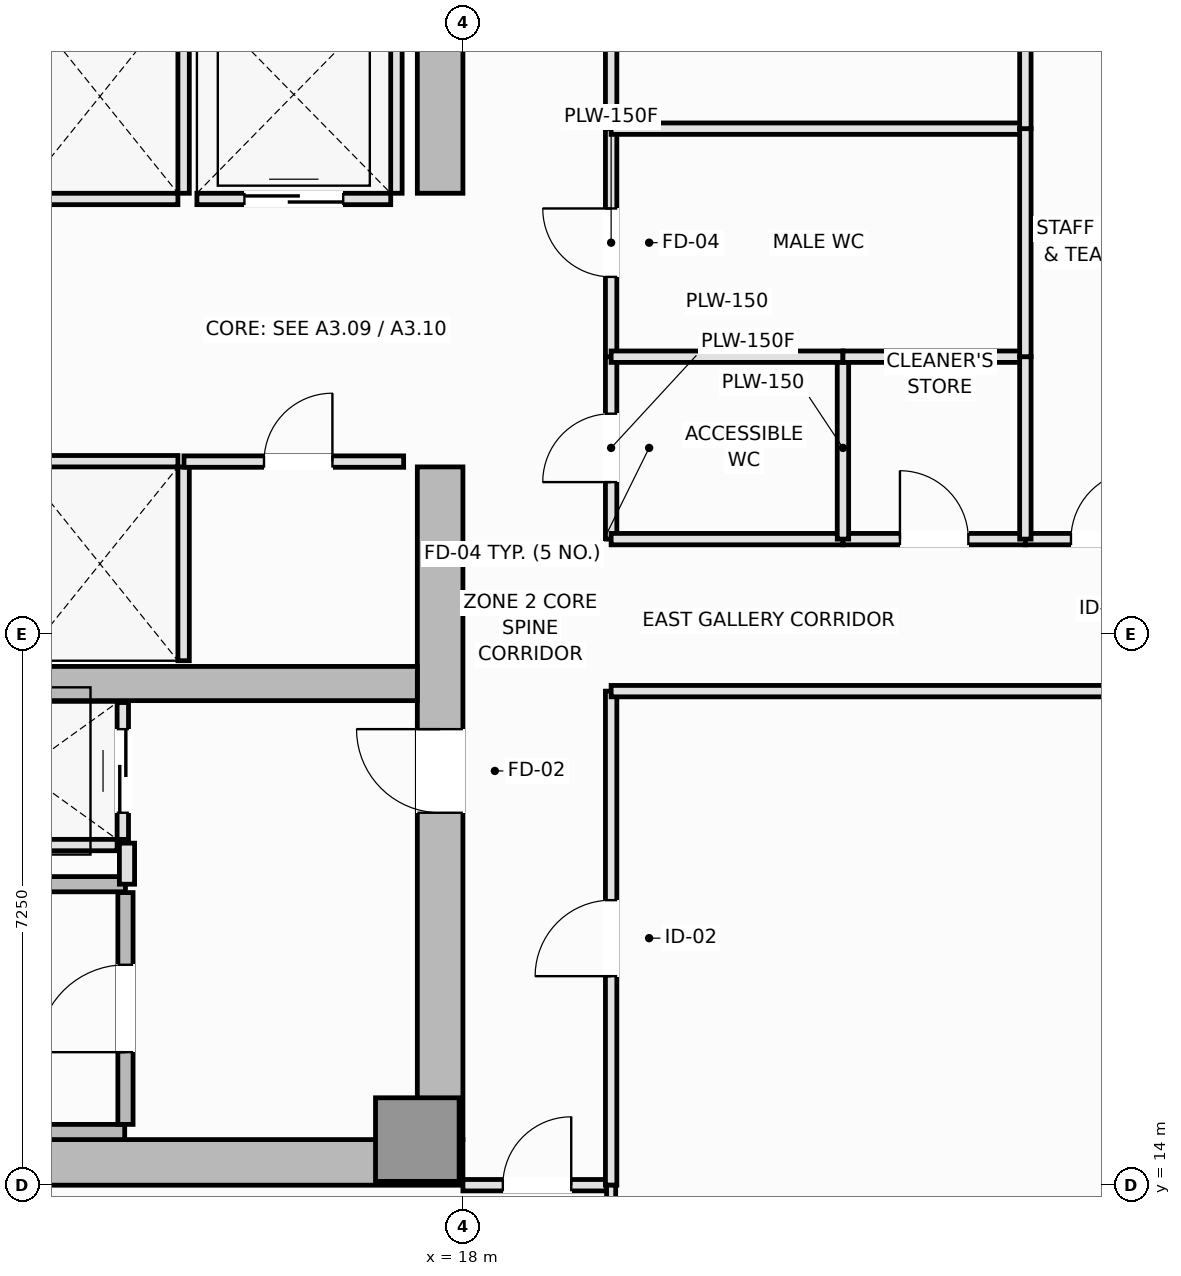
"""IFC4 building model, lengths in metres.
Left out: names, types, materials, properties, quantities, classifications, styles, units other than length and angle.
Written with IfcOpenShell. Run it as: python <this file> out.ifc"""

import sys

from ifc_helpers import new_model, si_unit, direction, frame, frame_2d, origin, origin_2d, place, context, subcontext, project, spatial, rectangle, extrude, element, fill, save


model = new_model("IFC4")
c1 = context("Model", 3, precision=1e-05, world=origin(), true_north=direction((0.0, 1.0)))
c2 = subcontext(c1, "Body", "Model", "MODEL_VIEW")
j1 = project(units=[si_unit("LENGTHUNIT", "METRE"), si_unit("PLANEANGLEUNIT", "RADIAN")], contexts=[c1])
p1 = place(None, origin())
s1 = spatial("IfcSite", under=j1, at=p1, CompositionType="ELEMENT")
p2 = place(p1, origin())
s2 = spatial("IfcBuilding", under=s1, at=p2, CompositionType="ELEMENT")
p3 = place(p2, frame((0.0, 0.0, 105.8)))
s3 = spatial("IfcBuildingStorey", under=s2, at=p3, CompositionType="ELEMENT", Elevation=105.8)
p4 = place(p3, frame((4.5, 14.3, 0.0), z_axis=(0.0, 0.0, 1.0), x_axis=(1.0, 0.0, 0.0)))
e1 = element("IfcWall", 1, at=p4, inside=s3, PredefinedType="SHEAR", context=c2, shape_type="SweptSolid", body=[
    extrude(rectangle(XDim=13.5, YDim=0.6, at=frame_2d((6.75, 0.0))), origin(), (0.0, 0.0, 1.0), 3.55),
])
p5 = place(p3, frame((17.7, 14.6, 0.0), z_axis=(0.0, 0.0, 1.0), x_axis=(0.0, 1.0, 0.0)))
e2 = element("IfcWall", 2, at=p5, inside=s3, PredefinedType="SHEAR", context=c2, shape_type="SweptSolid", body=[
    extrude(rectangle(XDim=8.85, YDim=0.6, at=frame_2d((4.425, 0.0))), origin(), (0.0, 0.0, 1.0), 3.55),
])
p6 = place(p5, frame((4.3, 0.0, 0.0)))
e3 = element("IfcOpeningElement", 3, at=p6, cuts=e2, PredefinedType="OPENING", context=c2, shape_type="SweptSolid", body=[
    extrude(rectangle(XDim=1.1, YDim=2.15, at=frame_2d((0.55, 1.075))), frame((0.0, 0.31, 0.0), z_axis=(0.0, -1.0, 0.0), x_axis=(1.0, 0.0, 0.0)), (0.0, 0.0, 1.0), 0.62),
])
p7 = place(p3, frame((17.7, 27.05, 0.0), z_axis=(0.0, 0.0, 1.0), x_axis=(0.0, 1.0, 0.0)))
e4 = element("IfcWall", 4, at=p7, inside=s3, PredefinedType="SHEAR", context=c2, shape_type="SweptSolid", body=[
    extrude(rectangle(XDim=8.85, YDim=0.6, at=frame_2d((4.425, 0.0))), origin(), (0.0, 0.0, 1.0), 3.55),
])
p8 = place(p7, frame((3.45, 0.0, 0.0)))
e5 = element("IfcOpeningElement", 5, at=p8, cuts=e4, PredefinedType="OPENING", context=c2, shape_type="SweptSolid", body=[
    extrude(rectangle(XDim=1.1, YDim=2.15, at=frame_2d((0.55, 1.075))), frame((0.0, 0.31, 0.0), z_axis=(0.0, -1.0, 0.0), x_axis=(1.0, 0.0, 0.0)), (0.0, 0.0, 1.0), 0.62),
])
p9 = place(p3, frame((5.1, 20.6, 0.0), z_axis=(0.0, 0.0, 1.0), x_axis=(1.0, 0.0, 0.0)))
e6 = element("IfcWall", 6, at=p9, inside=s3, PredefinedType="SHEAR", context=c2, shape_type="SweptSolid", body=[
    extrude(rectangle(XDim=12.3, YDim=0.45, at=frame_2d((6.15, 0.0))), origin(), (0.0, 0.0, 1.0), 3.55),
])
p10 = place(p3, frame((17.4, 14.6, 0.0), z_axis=(0.0, 0.0, 1.0), x_axis=(1.0, 0.0, 0.0)))
e7 = element("IfcColumn", 7, at=p10, inside=s3, PredefinedType="PILASTER", context=c2, shape_type="SweptSolid", body=[
    extrude(rectangle(XDim=1.1, YDim=1.1, at=origin_2d()), origin(), (0.0, 0.0, 1.0), 3.55),
])
p11 = place(p3, frame((5.8, 14.7, 0.0), z_axis=(0.0, 0.0, 1.0), x_axis=(1.0, 0.0, 0.0)))
e8 = element("IfcWall", 8, at=p11, inside=s3, PredefinedType="SOLIDWALL", context=c2, shape_type="SweptSolid", body=[
    extrude(rectangle(XDim=7.75, YDim=0.2, at=frame_2d((3.875, 0.0))), origin(), (0.0, 0.0, 1.0), 3.55),
])
p12 = place(p3, frame((5.9, 17.96, 0.0), z_axis=(0.0, 0.0, 1.0), x_axis=(1.0, 0.0, 0.0)))
e9 = element("IfcWall", 9, at=p12, inside=s3, PredefinedType="SOLIDWALL", context=c2, shape_type="SweptSolid", body=[
    extrude(rectangle(XDim=7.66, YDim=0.2, at=frame_2d((3.83, 0.0))), origin(), (0.0, 0.0, 1.0), 3.55),
])
p13 = place(p3, frame((13.56, 14.8, 0.0), z_axis=(0.0, 0.0, 1.0), x_axis=(0.0, 1.0, 0.0)))
e10 = element("IfcWall", 10, at=p13, inside=s3, PredefinedType="SOLIDWALL", context=c2, shape_type="SweptSolid", body=[
    extrude(rectangle(XDim=3.05, YDim=0.2, at=frame_2d((1.525, 0.0))), origin(), (0.0, 0.0, 1.0), 3.55),
])
p14 = place(p13, frame((0.95, 0.0, 0.0)))
e11 = element("IfcOpeningElement", 11, at=p14, cuts=e10, PredefinedType="OPENING", context=c2, shape_type="SweptSolid", body=[
    extrude(rectangle(XDim=1.15, YDim=2.15, at=frame_2d((0.575, 1.075))), frame((0.0, 0.11, 0.0), z_axis=(0.0, -1.0, 0.0), x_axis=(1.0, 0.0, 0.0)), (0.0, 0.0, 1.0), 0.22),
])
p15 = place(p3, frame((12.2, 23.525, 0.0), z_axis=(0.0, 0.0, 1.0), x_axis=(1.0, 0.0, 0.0)))
e12 = element("IfcWall", 12, at=p15, inside=s3, PredefinedType="PARTITIONING", context=c2, shape_type="SweptSolid", body=[
    extrude(rectangle(XDim=2.05, YDim=0.15, at=frame_2d((1.025, 0.0))), origin(), (0.0, 0.0, 1.0), 3.37),
])
p16 = place(p3, frame((14.325, 20.9, 0.0), z_axis=(0.0, 0.0, 1.0), x_axis=(0.0, 1.0, 0.0)))
e13 = element("IfcWall", 13, at=p16, inside=s3, PredefinedType="PARTITIONING", context=c2, shape_type="SweptSolid", body=[
    extrude(rectangle(XDim=2.55, YDim=0.15, at=frame_2d((1.275, 0.0))), origin(), (0.0, 0.0, 1.0), 3.37),
])
p17 = place(p3, frame((12.2, 26.975, 0.0), z_axis=(0.0, 0.0, 1.0), x_axis=(1.0, 0.0, 0.0)))
e14 = element("IfcWall", 14, at=p17, inside=s3, PredefinedType="PARTITIONING", context=c2, shape_type="SweptSolid", body=[
    extrude(rectangle(XDim=2.05, YDim=0.15, at=frame_2d((1.025, 0.0))), origin(), (0.0, 0.0, 1.0), 3.37),
])
p18 = place(p3, frame((14.325, 27.05, 0.0), z_axis=(0.0, 0.0, 1.0), x_axis=(0.0, 1.0, 0.0)))
e15 = element("IfcWall", 15, at=p18, inside=s3, PredefinedType="PARTITIONING", context=c2, shape_type="SweptSolid", body=[
    extrude(rectangle(XDim=2.55, YDim=0.15, at=frame_2d((1.275, 0.0))), origin(), (0.0, 0.0, 1.0), 3.37),
])
p19 = place(p3, frame((14.5, 26.975, 0.0), z_axis=(0.0, 0.0, 1.0), x_axis=(1.0, 0.0, 0.0)))
e16 = element("IfcWall", 16, at=p19, inside=s3, PredefinedType="PARTITIONING", context=c2, shape_type="SweptSolid", body=[
    extrude(rectangle(XDim=2.55, YDim=0.15, at=frame_2d((1.275, 0.0))), origin(), (0.0, 0.0, 1.0), 3.37),
])
p20 = place(p19, frame((0.625, 0.0, 0.0)))
e17 = element("IfcOpeningElement", 17, at=p20, cuts=e16, PredefinedType="OPENING", context=c2, shape_type="SweptSolid", body=[
    extrude(rectangle(XDim=1.3, YDim=2.2, at=frame_2d((0.65, 1.1))), frame((0.0, 0.085, 0.0), z_axis=(0.0, -1.0, 0.0), x_axis=(1.0, 0.0, 0.0)), (0.0, 0.0, 1.0), 0.17),
])
p21 = place(p3, frame((17.125, 27.05, 0.0), z_axis=(0.0, 0.0, 1.0), x_axis=(0.0, 1.0, 0.0)))
e18 = element("IfcWall", 18, at=p21, inside=s3, PredefinedType="PARTITIONING", context=c2, shape_type="SweptSolid", body=[
    extrude(rectangle(XDim=2.6, YDim=0.15, at=frame_2d((1.3, 0.0))), origin(), (0.0, 0.0, 1.0), 3.37),
])
p22 = place(p3, frame((10.95, 18.475, 0.0), z_axis=(0.0, 0.0, 1.0), x_axis=(1.0, 0.0, 0.0)))
e19 = element("IfcWall", 19, at=p22, inside=s3, PredefinedType="PARTITIONING", context=c2, shape_type="SweptSolid", body=[
    extrude(rectangle(XDim=2.5, YDim=0.15, at=frame_2d((1.25, 0.0))), origin(), (0.0, 0.0, 1.0), 3.37),
])
p23 = place(p3, frame((13.525, 18.55, 0.0), z_axis=(0.0, 0.0, 1.0), x_axis=(0.0, 1.0, 0.0)))
e20 = element("IfcWall", 20, at=p23, inside=s3, PredefinedType="PARTITIONING", context=c2, shape_type="SweptSolid", body=[
    extrude(rectangle(XDim=1.8, YDim=0.15, at=frame_2d((0.9, 0.0))), origin(), (0.0, 0.0, 1.0), 3.37),
])
p24 = place(p23, frame((0.35, 0.0, 0.0)))
e21 = element("IfcOpeningElement", 21, at=p24, cuts=e20, PredefinedType="OPENING", context=c2, shape_type="SweptSolid", body=[
    extrude(rectangle(XDim=1.1, YDim=2.2, at=frame_2d((0.55, 1.1))), frame((0.0, 0.085, 0.0), z_axis=(0.0, -1.0, 0.0), x_axis=(1.0, 0.0, 0.0)), (0.0, 0.0, 1.0), 0.17),
])
p25 = place(p3, frame((13.58, 17.96, 0.0), z_axis=(0.0, 0.0, 1.0), x_axis=(0.0, 1.0, 0.0)))
e22 = element("IfcWall", 22, at=p25, inside=s3, PredefinedType="PARTITIONING", context=c2, shape_type="SweptSolid", body=[
    extrude(rectangle(XDim=0.54, YDim=0.2, at=frame_2d((0.27, 0.0))), origin(), (0.0, 0.0, 1.0), 3.37),
])
p26 = place(p3, frame((14.33, 23.52, 0.0), z_axis=(0.0, 0.0, 1.0), x_axis=(1.0, 0.0, 0.0)))
e23 = element("IfcWall", 23, at=p26, inside=s3, PredefinedType="PARTITIONING", context=c2, shape_type="SweptSolid", body=[
    extrude(rectangle(XDim=2.89, YDim=0.15, at=frame_2d((1.445, 0.0))), origin(), (0.0, 0.0, 1.0), 3.37),
])
p27 = place(p26, frame((1.053, 0.0, 0.0)))
e24 = element("IfcOpeningElement", 24, at=p27, cuts=e23, PredefinedType="OPENING", context=c2, shape_type="SweptSolid", body=[
    extrude(rectangle(XDim=0.9, YDim=2.1, at=frame_2d((0.45, 1.05))), frame((0.0, 0.085, 0.0), z_axis=(0.0, -1.0, 0.0), x_axis=(1.0, 0.0, 0.0)), (0.0, 0.0, 1.0), 0.17),
])
p28 = place(p3, frame((19.95, 22.5, 0.0), z_axis=(0.0, 0.0, 1.0), x_axis=(0.0, 1.0, 0.0)))
e25 = element("IfcWall", 25, at=p28, inside=s3, PredefinedType="PLUMBINGWALL", context=c2, shape_type="SweptSolid", body=[
    extrude(rectangle(XDim=2.4, YDim=0.15, at=frame_2d((1.2, 0.0))), origin(), (0.0, 0.0, 1.0), 3.37),
])
p29 = place(p28, frame((0.75, 0.0, 0.0)))
e26 = element("IfcOpeningElement", 26, at=p29, cuts=e25, PredefinedType="OPENING", context=c2, shape_type="SweptSolid", body=[
    extrude(rectangle(XDim=0.9, YDim=2.1, at=frame_2d((0.45, 1.05))), frame((0.0, 0.085, 0.0), z_axis=(0.0, -1.0, 0.0), x_axis=(1.0, 0.0, 0.0)), (0.0, 0.0, 1.0), 0.17),
])
p30 = place(p3, frame((19.95, 24.9, 0.0), z_axis=(0.0, 0.0, 1.0), x_axis=(0.0, 1.0, 0.0)))
e27 = element("IfcWall", 27, at=p30, inside=s3, PredefinedType="PLUMBINGWALL", context=c2, shape_type="SweptSolid", body=[
    extrude(rectangle(XDim=3.0, YDim=0.15, at=frame_2d((1.5, 0.0))), origin(), (0.0, 0.0, 1.0), 3.37),
])
p31 = place(p30, frame((1.05, 0.0, 0.0)))
e28 = element("IfcOpeningElement", 28, at=p31, cuts=e27, PredefinedType="OPENING", context=c2, shape_type="SweptSolid", body=[
    extrude(rectangle(XDim=0.9, YDim=2.1, at=frame_2d((0.45, 1.05))), frame((0.0, 0.085, 0.0), z_axis=(0.0, -1.0, 0.0), x_axis=(1.0, 0.0, 0.0)), (0.0, 0.0, 1.0), 0.17),
])
p32 = place(p3, frame((19.95, 27.9, 0.0), z_axis=(0.0, 0.0, 1.0), x_axis=(0.0, 1.0, 0.0)))
e29 = element("IfcWall", 29, at=p32, inside=s3, PredefinedType="PLUMBINGWALL", context=c2, shape_type="SweptSolid", body=[
    extrude(rectangle(XDim=3.0, YDim=0.15, at=frame_2d((1.5, 0.0))), origin(), (0.0, 0.0, 1.0), 3.37),
])
p33 = place(p32, frame((1.05, 0.0, 0.0)))
e30 = element("IfcOpeningElement", 30, at=p33, cuts=e29, PredefinedType="OPENING", context=c2, shape_type="SweptSolid", body=[
    extrude(rectangle(XDim=0.9, YDim=2.1, at=frame_2d((0.45, 1.05))), frame((0.0, 0.085, 0.0), z_axis=(0.0, -1.0, 0.0), x_axis=(1.0, 0.0, 0.0)), (0.0, 0.0, 1.0), 0.17),
])
p34 = place(p3, frame((18.0, 14.0, 0.0), z_axis=(0.0, 0.0, 1.0), x_axis=(1.0, 0.0, 0.0)))
e31 = element("IfcWall", 31, at=p34, inside=s3, PredefinedType="PARTITIONING", context=c2, shape_type="SweptSolid", body=[
    extrude(rectangle(XDim=1.95, YDim=0.15, at=frame_2d((0.975, 0.0))), origin(), (0.0, 0.0, 1.0), 3.37),
])
p35 = place(p34, frame((0.525, 0.0, 0.0)))
e32 = element("IfcOpeningElement", 32, at=p35, cuts=e31, PredefinedType="OPENING", context=c2, shape_type="SweptSolid", body=[
    extrude(rectangle(XDim=0.9, YDim=2.1, at=frame_2d((0.45, 1.05))), frame((0.0, 0.085, 0.0), z_axis=(0.0, -1.0, 0.0), x_axis=(1.0, 0.0, 0.0)), (0.0, 0.0, 1.0), 0.17),
])
p36 = place(p3, frame((19.95, 14.0, 0.0), z_axis=(0.0, 0.0, 1.0), x_axis=(0.0, 1.0, 0.0)))
e33 = element("IfcWall", 33, at=p36, inside=s3, PredefinedType="PARTITIONING", context=c2, shape_type="SweptSolid", body=[
    extrude(rectangle(XDim=6.5, YDim=0.15, at=frame_2d((3.25, 0.0))), origin(), (0.0, 0.0, 1.0), 3.37),
])
p37 = place(p36, frame((2.75, 0.0, 0.0)))
e34 = element("IfcOpeningElement", 34, at=p37, cuts=e33, PredefinedType="OPENING", context=c2, shape_type="SweptSolid", body=[
    extrude(rectangle(XDim=1.0, YDim=2.15, at=frame_2d((0.5, 1.075))), frame((0.0, 0.085, 0.0), z_axis=(0.0, -1.0, 0.0), x_axis=(1.0, 0.0, 0.0)), (0.0, 0.0, 1.0), 0.17),
])
p38 = place(p3, frame((19.95, 22.5, 0.0), z_axis=(0.0, 0.0, 1.0), x_axis=(1.0, 0.0, 0.0)))
e35 = element("IfcWall", 35, at=p38, inside=s3, PredefinedType="PLUMBINGWALL", context=c2, shape_type="SweptSolid", body=[
    extrude(rectangle(XDim=3.05, YDim=0.15, at=frame_2d((1.525, 0.0))), origin(), (0.0, 0.0, 1.0), 3.37),
])
p39 = place(p3, frame((23.0, 22.5, 0.0), z_axis=(0.0, 0.0, 1.0), x_axis=(1.0, 0.0, 0.0)))
e36 = element("IfcWall", 36, at=p39, inside=s3, PredefinedType="PLUMBINGWALL", context=c2, shape_type="SweptSolid", body=[
    extrude(rectangle(XDim=2.4, YDim=0.15, at=frame_2d((1.2, 0.0))), origin(), (0.0, 0.0, 1.0), 3.37),
])
p40 = place(p39, frame((0.75, 0.0, 0.0)))
e37 = element("IfcOpeningElement", 37, at=p40, cuts=e36, PredefinedType="OPENING", context=c2, shape_type="SweptSolid", body=[
    extrude(rectangle(XDim=0.9, YDim=2.1, at=frame_2d((0.45, 1.05))), frame((0.0, 0.085, 0.0), z_axis=(0.0, -1.0, 0.0), x_axis=(1.0, 0.0, 0.0)), (0.0, 0.0, 1.0), 0.17),
])
p41 = place(p3, frame((25.4, 22.5, 0.0), z_axis=(0.0, 0.0, 1.0), x_axis=(1.0, 0.0, 0.0)))
e38 = element("IfcWall", 38, at=p41, inside=s3, PredefinedType="PARTITIONING", context=c2, shape_type="SweptSolid", body=[
    extrude(rectangle(XDim=2.1, YDim=0.15, at=frame_2d((1.05, 0.0))), origin(), (0.0, 0.0, 1.0), 3.37),
])
p42 = place(p41, frame((0.6, 0.0, 0.0)))
e39 = element("IfcOpeningElement", 39, at=p42, cuts=e38, PredefinedType="OPENING", context=c2, shape_type="SweptSolid", body=[
    extrude(rectangle(XDim=0.9, YDim=2.1, at=frame_2d((0.45, 1.05))), frame((0.0, 0.085, 0.0), z_axis=(0.0, -1.0, 0.0), x_axis=(1.0, 0.0, 0.0)), (0.0, 0.0, 1.0), 0.17),
])
p43 = place(p3, frame((19.95, 20.5, 0.0), z_axis=(0.0, 0.0, 1.0), x_axis=(1.0, 0.0, 0.0)))
e40 = element("IfcWall", 40, at=p43, inside=s3, PredefinedType="PARTITIONING", context=c2, shape_type="SweptSolid", body=[
    extrude(rectangle(XDim=7.55, YDim=0.15, at=frame_2d((3.775, 0.0))), origin(), (0.0, 0.0, 1.0), 3.37),
])
p44 = place(p3, frame((23.0, 22.5, 0.0), z_axis=(0.0, 0.0, 1.0), x_axis=(0.0, 1.0, 0.0)))
e41 = element("IfcWall", 41, at=p44, inside=s3, PredefinedType="PLUMBINGWALL", context=c2, shape_type="SweptSolid", body=[
    extrude(rectangle(XDim=2.4, YDim=0.15, at=frame_2d((1.2, 0.0))), origin(), (0.0, 0.0, 1.0), 3.37),
])
p45 = place(p3, frame((19.95, 24.9, 0.0), z_axis=(0.0, 0.0, 1.0), x_axis=(1.0, 0.0, 0.0)))
e42 = element("IfcWall", 42, at=p45, inside=s3, PredefinedType="PLUMBINGWALL", context=c2, shape_type="SweptSolid", body=[
    extrude(rectangle(XDim=3.05, YDim=0.15, at=frame_2d((1.525, 0.0))), origin(), (0.0, 0.0, 1.0), 3.37),
])
for number, where, z_axis, x_axis in (
    (43, (23.0, 24.9, 0.0), (0.0, 0.0, 1.0), (1.0, 0.0, 0.0)),
    (44, (25.4, 22.5, 0.0), (0.0, 0.0, 1.0), (0.0, 1.0, 0.0)),
):
    element("IfcWall", number, at=place(p3, frame(where, z_axis=z_axis, x_axis=x_axis)), inside=s3, PredefinedType="PLUMBINGWALL", context=c2, shape_type="SweptSolid", body=[
        extrude(rectangle(XDim=2.4, YDim=0.15, at=frame_2d((1.2, 0.0))), origin(), (0.0, 0.0, 1.0), 3.37),
    ])
p46 = place(p3, frame((19.95, 27.9, 0.0), z_axis=(0.0, 0.0, 1.0), x_axis=(1.0, 0.0, 0.0)))
e45 = element("IfcWall", 45, at=p46, inside=s3, PredefinedType="PLUMBINGWALL", context=c2, shape_type="SweptSolid", body=[
    extrude(rectangle(XDim=5.45, YDim=0.15, at=frame_2d((2.725, 0.0))), origin(), (0.0, 0.0, 1.0), 3.37),
])
for number, where, z_axis, x_axis in (
    (46, (25.4, 24.9, 0.0), (0.0, 0.0, 1.0), (0.0, 1.0, 0.0)),
    (47, (25.4, 27.9, 0.0), (0.0, 0.0, 1.0), (0.0, 1.0, 0.0)),
):
    element("IfcWall", number, at=place(p3, frame(where, z_axis=z_axis, x_axis=x_axis)), inside=s3, PredefinedType="PLUMBINGWALL", context=c2, shape_type="SweptSolid", body=[
        extrude(rectangle(XDim=3.0, YDim=0.15, at=frame_2d((1.5, 0.0))), origin(), (0.0, 0.0, 1.0), 3.37),
    ])
p47 = place(p3, frame((19.95, 3.51, 0.0), z_axis=(0.0, 0.0, 1.0), x_axis=(0.0, 1.0, 0.0)))
e48 = element("IfcWall", 48, at=p47, inside=s3, PredefinedType="PARTITIONING", context=c2, shape_type="SweptSolid", body=[
    extrude(rectangle(XDim=10.49, YDim=0.12, at=frame_2d((5.245, 0.0))), origin(), (0.0, 0.0, 1.0), 3.37),
])
p48 = place(p14, origin())
e49 = element("IfcDoor", 49, at=p48, inside=s3, OperationType="SINGLE_SWING_LEFT", PredefinedType="DOOR", context=c2, shape_type="SweptSolid", body=[
    extrude(rectangle(XDim=1.15, YDim=2.15, at=frame_2d((0.575, 1.075))), frame((0.0, 0.025, 0.0), z_axis=(0.0, -1.0, 0.0), x_axis=(1.0, 0.0, 0.0)), (0.0, 0.0, 1.0), 0.05),
])
fill(e11, e49)
p49 = place(p20, origin())
e50 = element("IfcDoor", 50, at=p49, inside=s3, OperationType="DOUBLE_DOOR_SLIDING", PredefinedType="DOOR", context=c2, shape_type="SweptSolid", body=[
    extrude(rectangle(XDim=1.3, YDim=2.2, at=frame_2d((0.65, 1.1))), frame((0.0, 0.025, 0.0), z_axis=(0.0, -1.0, 0.0), x_axis=(1.0, 0.0, 0.0)), (0.0, 0.0, 1.0), 0.05),
])
fill(e17, e50)
p50 = place(p24, origin())
e51 = element("IfcDoor", 51, at=p50, inside=s3, OperationType="DOUBLE_DOOR_SLIDING", PredefinedType="DOOR", context=c2, shape_type="SweptSolid", body=[
    extrude(rectangle(XDim=1.1, YDim=2.2, at=frame_2d((0.55, 1.1))), frame((0.0, 0.025, 0.0), z_axis=(0.0, -1.0, 0.0), x_axis=(1.0, 0.0, 0.0)), (0.0, 0.0, 1.0), 0.05),
])
fill(e21, e51)
p51 = place(p6, origin())
e52 = element("IfcDoor", 52, at=p51, inside=s3, OperationType="SINGLE_SWING_RIGHT", PredefinedType="DOOR", context=c2, shape_type="SweptSolid", body=[
    extrude(rectangle(XDim=1.1, YDim=2.15, at=frame_2d((0.55, 1.075))), frame((0.0, 0.025, 0.0), z_axis=(0.0, -1.0, 0.0), x_axis=(1.0, 0.0, 0.0)), (0.0, 0.0, 1.0), 0.05),
])
fill(e3, e52)
p52 = place(p27, origin())
e53 = element("IfcDoor", 53, at=p52, inside=s3, OperationType="SINGLE_SWING_RIGHT", PredefinedType="DOOR", context=c2, shape_type="SweptSolid", body=[
    extrude(rectangle(XDim=0.9, YDim=2.1, at=frame_2d((0.45, 1.05))), frame((0.0, 0.025, 0.0), z_axis=(0.0, -1.0, 0.0), x_axis=(1.0, 0.0, 0.0)), (0.0, 0.0, 1.0), 0.05),
])
fill(e24, e53)
p53 = place(p29, origin())
e54 = element("IfcDoor", 54, at=p53, inside=s3, OperationType="SINGLE_SWING_LEFT", PredefinedType="DOOR", context=c2, shape_type="SweptSolid", body=[
    extrude(rectangle(XDim=0.9, YDim=2.1, at=frame_2d((0.45, 1.05))), frame((0.0, 0.025, 0.0), z_axis=(0.0, -1.0, 0.0), x_axis=(1.0, 0.0, 0.0)), (0.0, 0.0, 1.0), 0.05),
])
fill(e26, e54)
p54 = place(p31, origin())
e55 = element("IfcDoor", 55, at=p54, inside=s3, OperationType="SINGLE_SWING_RIGHT", PredefinedType="DOOR", context=c2, shape_type="SweptSolid", body=[
    extrude(rectangle(XDim=0.9, YDim=2.1, at=frame_2d((0.45, 1.05))), frame((0.0, 0.025, 0.0), z_axis=(0.0, -1.0, 0.0), x_axis=(1.0, 0.0, 0.0)), (0.0, 0.0, 1.0), 0.05),
])
fill(e28, e55)
p55 = place(p35, origin())
e56 = element("IfcDoor", 56, at=p55, inside=s3, OperationType="SINGLE_SWING_RIGHT", PredefinedType="DOOR", context=c2, shape_type="SweptSolid", body=[
    extrude(rectangle(XDim=0.9, YDim=2.1, at=frame_2d((0.45, 1.05))), frame((0.0, 0.025, 0.0), z_axis=(0.0, -1.0, 0.0), x_axis=(1.0, 0.0, 0.0)), (0.0, 0.0, 1.0), 0.05),
])
fill(e32, e56)
p56 = place(p37, origin())
e57 = element("IfcDoor", 57, at=p56, inside=s3, OperationType="SINGLE_SWING_LEFT", PredefinedType="DOOR", context=c2, shape_type="SweptSolid", body=[
    extrude(rectangle(XDim=1.0, YDim=2.15, at=frame_2d((0.5, 1.075))), frame((0.0, 0.025, 0.0), z_axis=(0.0, -1.0, 0.0), x_axis=(1.0, 0.0, 0.0)), (0.0, 0.0, 1.0), 0.05),
])
fill(e34, e57)
p57 = place(p40, origin())
e58 = element("IfcDoor", 58, at=p57, inside=s3, OperationType="SINGLE_SWING_LEFT", PredefinedType="DOOR", context=c2, shape_type="SweptSolid", body=[
    extrude(rectangle(XDim=0.9, YDim=2.1, at=frame_2d((0.45, 1.05))), frame((0.0, 0.025, 0.0), z_axis=(0.0, -1.0, 0.0), x_axis=(1.0, 0.0, 0.0)), (0.0, 0.0, 1.0), 0.05),
])
fill(e37, e58)
p58 = place(p42, origin())
e59 = element("IfcDoor", 59, at=p58, inside=s3, OperationType="SINGLE_SWING_RIGHT", PredefinedType="DOOR", context=c2, shape_type="SweptSolid", body=[
    extrude(rectangle(XDim=0.9, YDim=2.1, at=frame_2d((0.45, 1.05))), frame((0.0, 0.025, 0.0), z_axis=(0.0, -1.0, 0.0), x_axis=(1.0, 0.0, 0.0)), (0.0, 0.0, 1.0), 0.05),
])
fill(e39, e59)
save(model, sys.argv[1])
